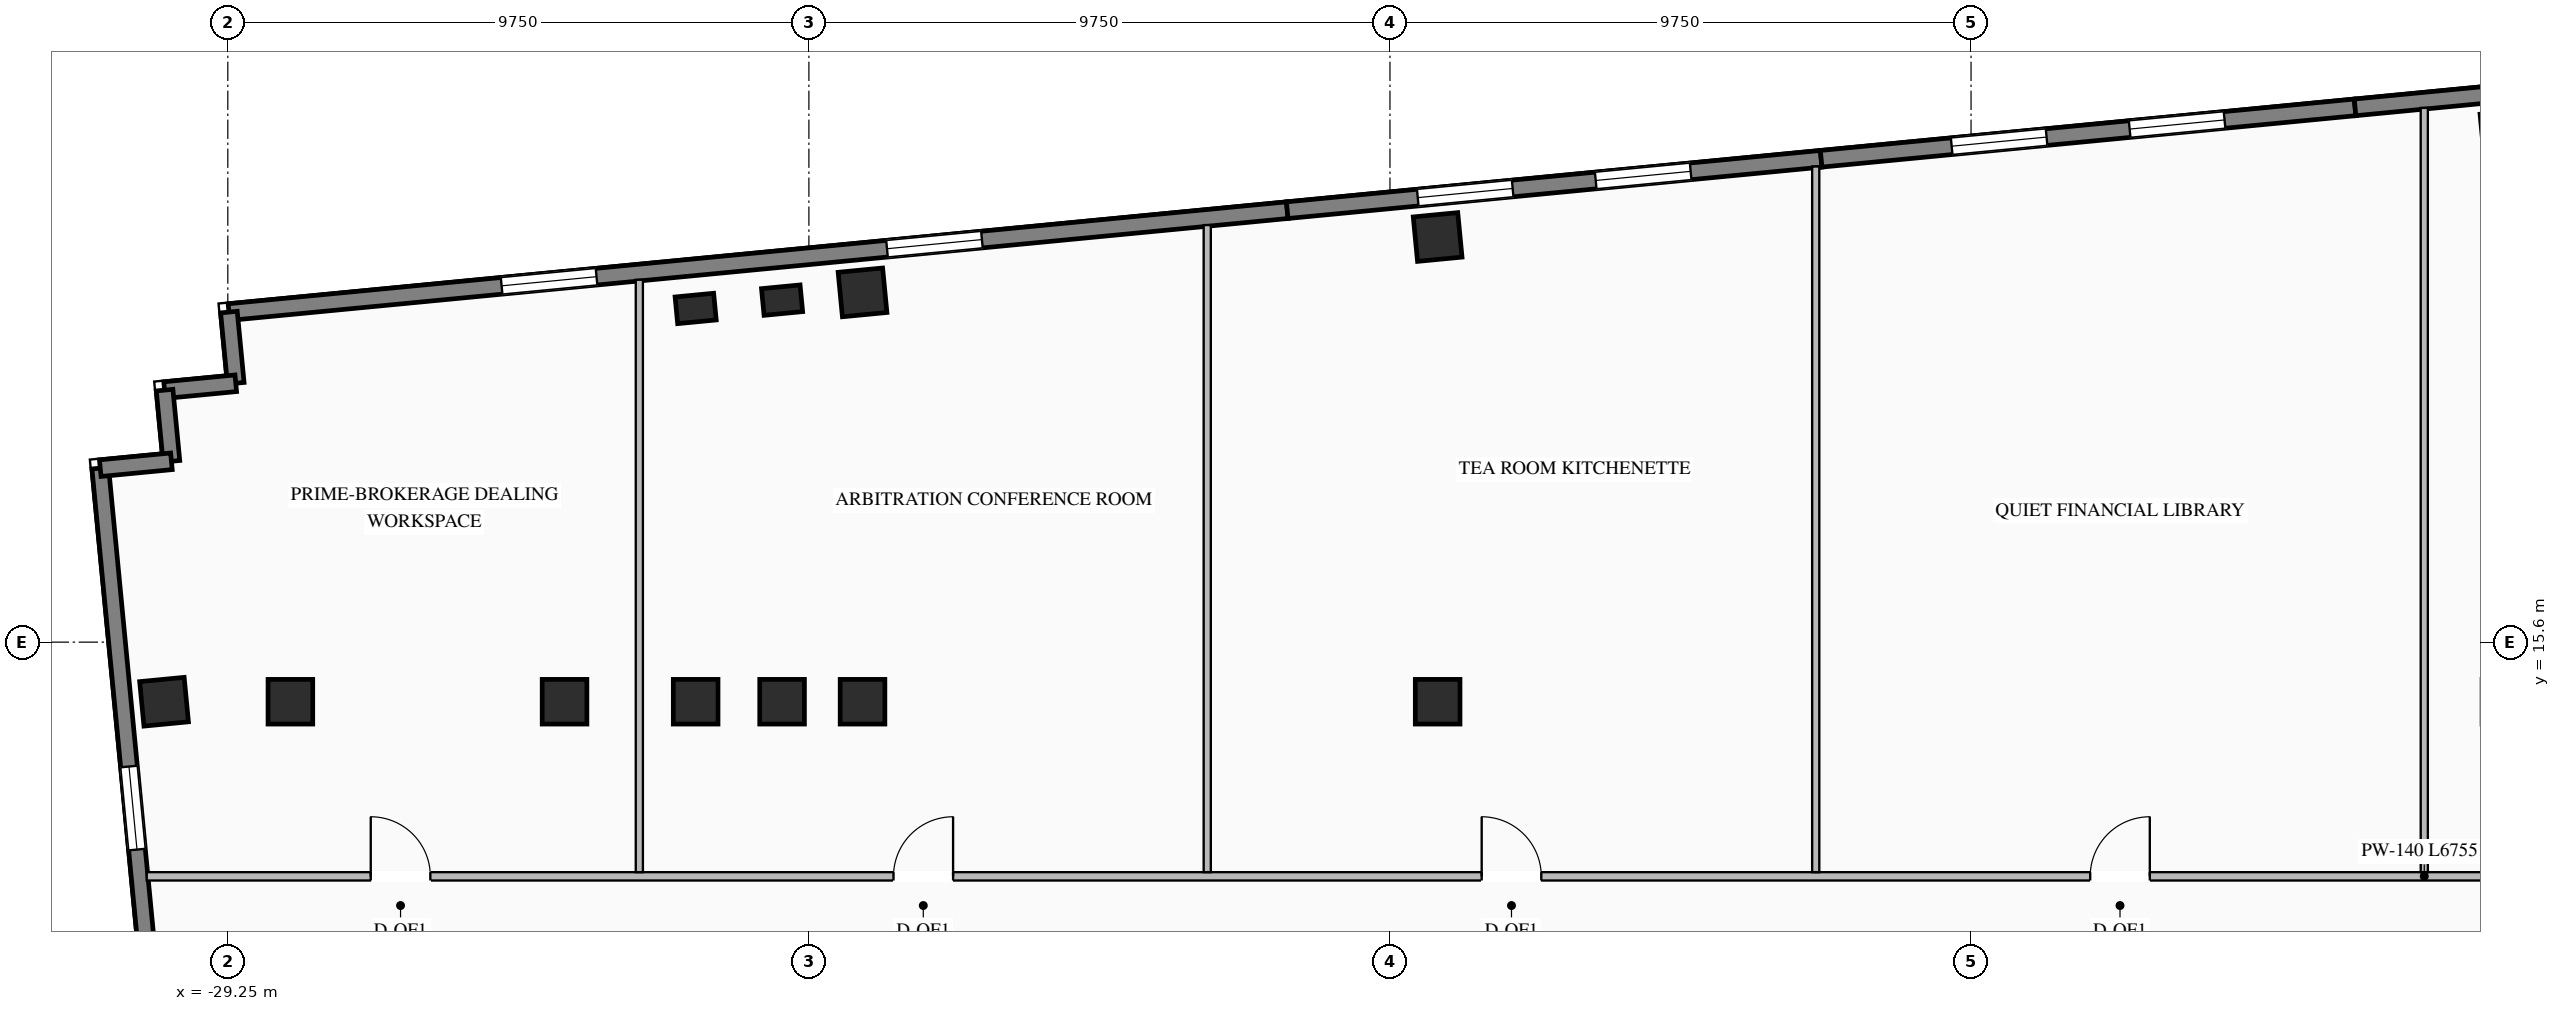
"""IFC4 building model, lengths in metres.
Left out: names, types, materials, properties, quantities, classifications, styles, units other than length and angle.
Written with IfcOpenShell. Run it as: python <this file> out.ifc"""

import sys

from ifc_helpers import new_model, si_unit, direction, frame, frame_2d, origin, origin_2d, place, context, subcontext, project, spatial, rectangle, i_section, extrude, element, fill, save


model = new_model("IFC4")
c1 = context("Model", 3, precision=1e-05, world=origin(), true_north=direction((0.0, 1.0)))
c2 = subcontext(c1, "Body", "Model", "MODEL_VIEW")
j1 = project(units=[si_unit("LENGTHUNIT", "METRE"), si_unit("PLANEANGLEUNIT", "RADIAN")], contexts=[c1])
p1 = place(None, origin())
s1 = spatial("IfcSite", under=j1, at=p1, CompositionType="ELEMENT")
p2 = place(p1, origin())
s2 = spatial("IfcBuilding", under=s1, at=p2, CompositionType="ELEMENT")
p3 = place(p2, frame((0.0, 0.0, 101.8)))
s3 = spatial("IfcBuildingStorey", under=s2, at=p3, CompositionType="ELEMENT", Elevation=101.8)
for number, where, z_axis, x_axis in (
    (1, (-21.4, 14.6, 0.0), (0.0, 0.0, 1.0), (1.0, 0.0, 0.0)),
    (2, (-19.95, 14.6, 0.0), (0.0, 0.0, 1.0), (1.0, 0.0, 0.0)),
    (3, (-18.6, 14.6, 0.0), (0.0, 0.0, 1.0), (1.0, 0.0, 0.0)),
    (4, (-8.95, 14.6, 0.0), (0.0, 0.0, 1.0), (1.0, 0.0, 0.0)),
    (5, (-23.6, 14.6, 0.0), (0.0, 0.0, 1.0), (1.0, 0.0, 0.0)),
    (6, (-28.2, 14.6, 0.0), (0.0, 0.0, 1.0), (1.0, 0.0, 0.0)),
    (7, (-18.6, 21.469, 0.0), (0.0, 0.0, 1.0), (0.995, 0.096, 0.0)),
    (8, (-8.95, 22.398, 0.0), (0.0, 0.0, 1.0), (0.995, 0.096, 0.0)),
    (9, (8.95, 24.122, 0.0), (0.0, 0.0, 1.0), (0.995, 0.096, 0.0)),
    (10, (-30.32, 14.6, 0.0), (0.0, 0.0, 1.0), (0.995, 0.096, 0.0)),
):
    element("IfcColumn", number, at=place(p3, frame(where, z_axis=z_axis, x_axis=x_axis)), inside=s3, PredefinedType="COLUMN", context=c2, shape_type="SweptSolid", body=[
        extrude(i_section(OverallWidth=0.75, OverallDepth=0.75, WebThickness=0.03, FlangeThickness=0.044, at=origin_2d()), origin(), (0.0, 0.0, 1.0), 3.45),
    ])
for number, where, z_axis, x_axis in (
    (11, (-21.4, 21.199, 0.0), (0.0, 0.0, 1.0), (0.995, 0.096, 0.0)),
    (12, (-19.95, 21.339, 0.0), (0.0, 0.0, 1.0), (0.995, 0.096, 0.0)),
):
    element("IfcColumn", number, at=place(p3, frame(where, z_axis=z_axis, x_axis=x_axis)), inside=s3, PredefinedType="PILASTER", context=c2, shape_type="SweptSolid", body=[
        extrude(rectangle(XDim=0.65, YDim=0.45, at=origin_2d()), origin(), (0.0, 0.0, 1.0), 3.45),
    ])
p4 = place(p3, frame((-29.231, 21.138, 0.0), z_axis=(0.0, 0.0, 1.0), x_axis=(0.995395780835, 0.095850088663, 0.0)))
e13 = element("IfcWall", 13, at=p4, inside=s3, PredefinedType="STANDARD", context=c2, shape_type="SweptSolid", body=[
    extrude(rectangle(XDim=17.84, YDim=0.28, at=frame_2d((8.92, 0.0))), origin(), (0.0, 0.0, 1.0), 3.25),
])
p5 = place(p4, frame((4.597, 0.0, 0.76)))
e14 = element("IfcOpeningElement", 14, at=p5, cuts=e13, PredefinedType="OPENING", context=c2, shape_type="SweptSolid", body=[
    extrude(rectangle(XDim=1.6, YDim=1.95, at=frame_2d((0.8, 0.975))), frame((0.0, 0.15, 0.0), z_axis=(0.0, -1.0, 0.0), x_axis=(1.0, 0.0, 0.0)), (0.0, 0.0, 1.0), 0.3),
])
p6 = place(p4, frame((11.093, 0.0, 0.76)))
e15 = element("IfcOpeningElement", 15, at=p6, cuts=e13, PredefinedType="OPENING", context=c2, shape_type="SweptSolid", body=[
    extrude(rectangle(XDim=1.6, YDim=1.95, at=frame_2d((0.8, 0.975))), frame((0.0, 0.15, 0.0), z_axis=(0.0, -1.0, 0.0), x_axis=(1.0, 0.0, 0.0)), (0.0, 0.0, 1.0), 0.3),
])
p7 = place(p3, frame((-11.474, 22.848, 0.0), z_axis=(0.0, 0.0, 1.0), x_axis=(0.995396794462, 0.09583956164, 0.0)))
e16 = element("IfcWall", 16, at=p7, inside=s3, PredefinedType="STANDARD", context=c2, shape_type="SweptSolid", body=[
    extrude(rectangle(XDim=9.0, YDim=0.28, at=frame_2d((4.5, 0.0))), origin(), (0.0, 0.0, 1.0), 3.25),
])
p8 = place(p7, frame((2.2, 0.0, 0.76)))
e17 = element("IfcOpeningElement", 17, at=p8, cuts=e16, PredefinedType="OPENING", context=c2, shape_type="SweptSolid", body=[
    extrude(rectangle(XDim=1.6, YDim=1.95, at=frame_2d((0.8, 0.975))), frame((0.0, 0.15, 0.0), z_axis=(0.0, -1.0, 0.0), x_axis=(1.0, 0.0, 0.0)), (0.0, 0.0, 1.0), 0.3),
])
p9 = place(p7, frame((5.2, 0.0, 0.76)))
e18 = element("IfcOpeningElement", 18, at=p9, cuts=e16, PredefinedType="OPENING", context=c2, shape_type="SweptSolid", body=[
    extrude(rectangle(XDim=1.6, YDim=1.95, at=frame_2d((0.8, 0.975))), frame((0.0, 0.15, 0.0), z_axis=(0.0, -1.0, 0.0), x_axis=(1.0, 0.0, 0.0)), (0.0, 0.0, 1.0), 0.3),
])
p10 = place(p3, frame((-2.515, 23.711, 0.0), z_axis=(0.0, 0.0, 1.0), x_axis=(0.995397043619, 0.095836973841, 0.0)))
e19 = element("IfcWall", 19, at=p10, inside=s3, PredefinedType="STANDARD", context=c2, shape_type="SweptSolid", body=[
    extrude(rectangle(XDim=9.0, YDim=0.28, at=frame_2d((4.5, 0.0))), origin(), (0.0, 0.0, 1.0), 3.25),
])
p11 = place(p10, frame((2.2, 0.0, 0.76)))
e20 = element("IfcOpeningElement", 20, at=p11, cuts=e19, PredefinedType="OPENING", context=c2, shape_type="SweptSolid", body=[
    extrude(rectangle(XDim=1.6, YDim=1.95, at=frame_2d((0.8, 0.975))), frame((0.0, 0.15, 0.0), z_axis=(0.0, -1.0, 0.0), x_axis=(1.0, 0.0, 0.0)), (0.0, 0.0, 1.0), 0.3),
])
p12 = place(p10, frame((5.2, 0.0, 0.76)))
e21 = element("IfcOpeningElement", 21, at=p12, cuts=e19, PredefinedType="OPENING", context=c2, shape_type="SweptSolid", body=[
    extrude(rectangle(XDim=1.6, YDim=1.95, at=frame_2d((0.8, 0.975))), frame((0.0, 0.15, 0.0), z_axis=(0.0, -1.0, 0.0), x_axis=(1.0, 0.0, 0.0)), (0.0, 0.0, 1.0), 0.3),
])
p13 = place(p3, frame((6.444, 24.573, 0.0), z_axis=(0.0, 0.0, 1.0), x_axis=(0.995396794462, 0.09583956164, 0.0)))
e22 = element("IfcWall", 22, at=p13, inside=s3, PredefinedType="STANDARD", context=c2, shape_type="SweptSolid", body=[
    extrude(rectangle(XDim=9.0, YDim=0.28, at=frame_2d((4.5, 0.0))), origin(), (0.0, 0.0, 1.0), 3.25),
])
p14 = place(p13, frame((2.2, 0.0, 0.76)))
e23 = element("IfcOpeningElement", 23, at=p14, cuts=e22, PredefinedType="OPENING", context=c2, shape_type="SweptSolid", body=[
    extrude(rectangle(XDim=1.6, YDim=1.95, at=frame_2d((0.8, 0.975))), frame((0.0, 0.15, 0.0), z_axis=(0.0, -1.0, 0.0), x_axis=(1.0, 0.0, 0.0)), (0.0, 0.0, 1.0), 0.3),
])
p15 = place(p13, frame((5.2, 0.0, 0.76)))
e24 = element("IfcOpeningElement", 24, at=p15, cuts=e22, PredefinedType="OPENING", context=c2, shape_type="SweptSolid", body=[
    extrude(rectangle(XDim=1.6, YDim=1.95, at=frame_2d((0.8, 0.975))), frame((0.0, 0.15, 0.0), z_axis=(0.0, -1.0, 0.0), x_axis=(1.0, 0.0, 0.0)), (0.0, 0.0, 1.0), 0.3),
])
p16 = place(p3, frame((-29.585, -0.234, 0.0), z_axis=(0.0, 0.0, 1.0), x_axis=(-0.095841297881, 0.99539662729, 0.0)))
e25 = element("IfcWall", 25, at=p16, inside=s3, PredefinedType="STANDARD", context=c2, shape_type="SweptSolid", body=[
    extrude(rectangle(XDim=18.84, YDim=0.28, at=frame_2d((9.42, 0.0))), origin(), (0.0, 0.0, 1.0), 3.25),
])
p17 = place(p16, frame((5.58, 0.0, 0.76)))
e26 = element("IfcOpeningElement", 26, at=p17, cuts=e25, PredefinedType="OPENING", context=c2, shape_type="SweptSolid", body=[
    extrude(rectangle(XDim=1.4, YDim=1.95, at=frame_2d((0.7, 0.975))), frame((0.0, 0.15, 0.0), z_axis=(0.0, -1.0, 0.0), x_axis=(1.0, 0.0, 0.0)), (0.0, 0.0, 1.0), 0.3),
])
p18 = place(p16, frame((12.41, 0.0, 0.76)))
e27 = element("IfcOpeningElement", 27, at=p18, cuts=e25, PredefinedType="OPENING", context=c2, shape_type="SweptSolid", body=[
    extrude(rectangle(XDim=1.4, YDim=1.95, at=frame_2d((0.7, 0.975))), frame((0.0, 0.15, 0.0), z_axis=(0.0, -1.0, 0.0), x_axis=(1.0, 0.0, 0.0)), (0.0, 0.0, 1.0), 0.3),
])
for number, where, z_axis, x_axis in (
    (28, (-29.231, 21.138, 0.0), (0.0, 0.0, 1.0), (0.096, -0.995, 0.0)),
    (29, (-29.116, 19.944, 0.0), (0.0, 0.0, 1.0), (-0.995, -0.096, 0.0)),
):
    element("IfcWall", number, at=place(p3, frame(where, z_axis=z_axis, x_axis=x_axis)), inside=s3, PredefinedType="STANDARD", context=c2, shape_type="SweptSolid", body=[
        extrude(rectangle(XDim=1.2, YDim=0.28, at=frame_2d((0.6, 0.0))), origin(), (0.0, 0.0, 1.0), 3.25),
    ])
for number, where, z_axis, x_axis in (
    (30, (-30.311, 19.829, 0.0), (0.0, 0.0, 1.0), (0.096, -0.995, 0.0)),
    (31, (-30.196, 18.635, 0.0), (0.0, 0.0, 1.0), (-0.995, -0.096, 0.0)),
):
    element("IfcWall", number, at=place(p3, frame(where, z_axis=z_axis, x_axis=x_axis)), inside=s3, PredefinedType="STANDARD", context=c2, shape_type="SweptSolid", body=[
        extrude(rectangle(XDim=1.2, YDim=0.28, at=frame_2d((0.6, 0.0))), origin(), (0.0, 0.0, 1.0), 3.25),
    ])
p19 = place(p3, frame((-30.61, 11.67, 0.0), z_axis=(0.0, 0.0, 1.0), x_axis=(1.0, 0.0, 0.0)))
e32 = element("IfcWall", 32, at=p19, inside=s3, PredefinedType="STANDARD", context=c2, shape_type="SweptSolid", body=[
    extrude(rectangle(XDim=67.551, YDim=0.14, at=frame_2d((33.775, 0.0))), origin(), (0.0, 0.0, 1.0), 3.25),
])
p20 = place(p19, frame((3.759, 0.0, 0.0)))
e33 = element("IfcOpeningElement", 33, at=p20, cuts=e32, PredefinedType="OPENING", context=c2, shape_type="SweptSolid", body=[
    extrude(rectangle(XDim=1.0, YDim=2.08, at=frame_2d((0.5, 1.04))), frame((0.0, 0.08, 0.0), z_axis=(0.0, -1.0, 0.0), x_axis=(1.0, 0.0, 0.0)), (0.0, 0.0, 1.0), 0.16),
])
p21 = place(p19, frame((12.53, 0.0, 0.0)))
e34 = element("IfcOpeningElement", 34, at=p21, cuts=e32, PredefinedType="OPENING", context=c2, shape_type="SweptSolid", body=[
    extrude(rectangle(XDim=1.0, YDim=2.08, at=frame_2d((0.5, 1.04))), frame((0.0, 0.08, 0.0), z_axis=(0.0, -1.0, 0.0), x_axis=(1.0, 0.0, 0.0)), (0.0, 0.0, 1.0), 0.16),
])
p22 = place(p19, frame((22.399, 0.0, 0.0)))
e35 = element("IfcOpeningElement", 35, at=p22, cuts=e32, PredefinedType="OPENING", context=c2, shape_type="SweptSolid", body=[
    extrude(rectangle(XDim=1.0, YDim=2.08, at=frame_2d((0.5, 1.04))), frame((0.0, 0.08, 0.0), z_axis=(0.0, -1.0, 0.0), x_axis=(1.0, 0.0, 0.0)), (0.0, 0.0, 1.0), 0.16),
])
p23 = place(p19, frame((32.61, 0.0, 0.0)))
e36 = element("IfcOpeningElement", 36, at=p23, cuts=e32, PredefinedType="OPENING", context=c2, shape_type="SweptSolid", body=[
    extrude(rectangle(XDim=1.0, YDim=2.08, at=frame_2d((0.5, 1.04))), frame((0.0, 0.08, 0.0), z_axis=(0.0, -1.0, 0.0), x_axis=(1.0, 0.0, 0.0)), (0.0, 0.0, 1.0), 0.16),
])
p24 = place(p19, frame((42.82, 0.0, 0.0)))
e37 = element("IfcOpeningElement", 37, at=p24, cuts=e32, PredefinedType="OPENING", context=c2, shape_type="SweptSolid", body=[
    extrude(rectangle(XDim=1.0, YDim=2.08, at=frame_2d((0.5, 1.04))), frame((0.0, 0.08, 0.0), z_axis=(0.0, -1.0, 0.0), x_axis=(1.0, 0.0, 0.0)), (0.0, 0.0, 1.0), 0.16),
])
p25 = place(p19, frame((52.69, 0.0, 0.0)))
e38 = element("IfcOpeningElement", 38, at=p25, cuts=e32, PredefinedType="OPENING", context=c2, shape_type="SweptSolid", body=[
    extrude(rectangle(XDim=1.0, YDim=2.08, at=frame_2d((0.5, 1.04))), frame((0.0, 0.08, 0.0), z_axis=(0.0, -1.0, 0.0), x_axis=(1.0, 0.0, 0.0)), (0.0, 0.0, 1.0), 0.16),
])
p26 = place(p19, frame((62.127, 0.0, 0.0)))
e39 = element("IfcOpeningElement", 39, at=p26, cuts=e32, PredefinedType="OPENING", context=c2, shape_type="SweptSolid", body=[
    extrude(rectangle(XDim=1.0, YDim=2.08, at=frame_2d((0.5, 1.04))), frame((0.0, 0.08, 0.0), z_axis=(0.0, -1.0, 0.0), x_axis=(1.0, 0.0, 0.0)), (0.0, 0.0, 1.0), 0.16),
])
p27 = place(p3, frame((-22.345, 11.74, 0.0), z_axis=(0.0, 0.0, 1.0), x_axis=(0.0, 1.0, 0.0)))
e40 = element("IfcWall", 40, at=p27, inside=s3, PredefinedType="STANDARD", context=c2, shape_type="SweptSolid", body=[
    extrude(rectangle(XDim=9.941, YDim=0.12, at=frame_2d((4.97, 0.0))), origin(), (0.0, 0.0, 1.0), 3.25),
])
p28 = place(p3, frame((-12.816, 11.74, 0.0), z_axis=(0.0, 0.0, 1.0), x_axis=(0.0, 1.0, 0.0)))
e41 = element("IfcWall", 41, at=p28, inside=s3, PredefinedType="STANDARD", context=c2, shape_type="SweptSolid", body=[
    extrude(rectangle(XDim=10.858, YDim=0.12, at=frame_2d((5.429, 0.0))), origin(), (0.0, 0.0, 1.0), 3.25),
])
p29 = place(p3, frame((-2.606, 11.74, 0.0), z_axis=(0.0, 0.0, 1.0), x_axis=(0.0, 1.0, 0.0)))
e42 = element("IfcWall", 42, at=p29, inside=s3, PredefinedType="STANDARD", context=c2, shape_type="SweptSolid", body=[
    extrude(rectangle(XDim=11.842, YDim=0.12, at=frame_2d((5.921, 0.0))), origin(), (0.0, 0.0, 1.0), 3.25),
])
p30 = place(p3, frame((7.605, 11.74, 0.0), z_axis=(0.0, 0.0, 1.0), x_axis=(0.0, 1.0, 0.0)))
e43 = element("IfcWall", 43, at=p30, inside=s3, PredefinedType="STANDARD", context=c2, shape_type="SweptSolid", body=[
    extrude(rectangle(XDim=12.825, YDim=0.12, at=frame_2d((6.412, 0.0))), origin(), (0.0, 0.0, 1.0), 3.25),
])
p31 = place(p5, origin())
e44 = element("IfcWindow", 44, at=p31, inside=s3, PartitioningType="SINGLE_PANEL", PredefinedType="WINDOW", context=c2, shape_type="SweptSolid", body=[
    extrude(rectangle(XDim=1.6, YDim=1.95, at=frame_2d((0.8, 0.975))), frame((0.0, 0.03, 0.0), z_axis=(0.0, -1.0, 0.0), x_axis=(1.0, 0.0, 0.0)), (0.0, 0.0, 1.0), 0.06),
])
fill(e14, e44)
p32 = place(p6, origin())
e45 = element("IfcWindow", 45, at=p32, inside=s3, PartitioningType="SINGLE_PANEL", PredefinedType="WINDOW", context=c2, shape_type="SweptSolid", body=[
    extrude(rectangle(XDim=1.6, YDim=1.95, at=frame_2d((0.8, 0.975))), frame((0.0, 0.03, 0.0), z_axis=(0.0, -1.0, 0.0), x_axis=(1.0, 0.0, 0.0)), (0.0, 0.0, 1.0), 0.06),
])
fill(e15, e45)
p33 = place(p8, origin())
e46 = element("IfcWindow", 46, at=p33, inside=s3, PartitioningType="SINGLE_PANEL", PredefinedType="WINDOW", context=c2, shape_type="SweptSolid", body=[
    extrude(rectangle(XDim=1.6, YDim=1.95, at=frame_2d((0.8, 0.975))), frame((0.0, 0.03, 0.0), z_axis=(0.0, -1.0, 0.0), x_axis=(1.0, 0.0, 0.0)), (0.0, 0.0, 1.0), 0.06),
])
fill(e17, e46)
p34 = place(p9, origin())
e47 = element("IfcWindow", 47, at=p34, inside=s3, PartitioningType="SINGLE_PANEL", PredefinedType="WINDOW", context=c2, shape_type="SweptSolid", body=[
    extrude(rectangle(XDim=1.6, YDim=1.95, at=frame_2d((0.8, 0.975))), frame((0.0, 0.03, 0.0), z_axis=(0.0, -1.0, 0.0), x_axis=(1.0, 0.0, 0.0)), (0.0, 0.0, 1.0), 0.06),
])
fill(e18, e47)
p35 = place(p11, origin())
e48 = element("IfcWindow", 48, at=p35, inside=s3, PartitioningType="SINGLE_PANEL", PredefinedType="WINDOW", context=c2, shape_type="SweptSolid", body=[
    extrude(rectangle(XDim=1.6, YDim=1.95, at=frame_2d((0.8, 0.975))), frame((0.0, 0.03, 0.0), z_axis=(0.0, -1.0, 0.0), x_axis=(1.0, 0.0, 0.0)), (0.0, 0.0, 1.0), 0.06),
])
fill(e20, e48)
p36 = place(p12, origin())
e49 = element("IfcWindow", 49, at=p36, inside=s3, PartitioningType="SINGLE_PANEL", PredefinedType="WINDOW", context=c2, shape_type="SweptSolid", body=[
    extrude(rectangle(XDim=1.6, YDim=1.95, at=frame_2d((0.8, 0.975))), frame((0.0, 0.03, 0.0), z_axis=(0.0, -1.0, 0.0), x_axis=(1.0, 0.0, 0.0)), (0.0, 0.0, 1.0), 0.06),
])
fill(e21, e49)
p37 = place(p18, origin())
e50 = element("IfcWindow", 50, at=p37, inside=s3, PartitioningType="SINGLE_PANEL", PredefinedType="WINDOW", context=c2, shape_type="SweptSolid", body=[
    extrude(rectangle(XDim=1.4, YDim=1.95, at=frame_2d((0.7, 0.975))), frame((0.0, 0.03, 0.0), z_axis=(0.0, -1.0, 0.0), x_axis=(1.0, 0.0, 0.0)), (0.0, 0.0, 1.0), 0.06),
])
fill(e27, e50)
p38 = place(p20, origin())
e51 = element("IfcDoor", 51, at=p38, inside=s3, OperationType="SINGLE_SWING_LEFT", PredefinedType="DOOR", context=c2, shape_type="SweptSolid", body=[
    extrude(rectangle(XDim=1.0, YDim=2.08, at=frame_2d((0.5, 1.04))), frame((0.0, 0.025, 0.0), z_axis=(0.0, -1.0, 0.0), x_axis=(1.0, 0.0, 0.0)), (0.0, 0.0, 1.0), 0.05),
])
fill(e33, e51)
p39 = place(p21, origin())
e52 = element("IfcDoor", 52, at=p39, inside=s3, OperationType="SINGLE_SWING_RIGHT", PredefinedType="DOOR", context=c2, shape_type="SweptSolid", body=[
    extrude(rectangle(XDim=1.0, YDim=2.08, at=frame_2d((0.5, 1.04))), frame((0.0, 0.025, 0.0), z_axis=(0.0, -1.0, 0.0), x_axis=(1.0, 0.0, 0.0)), (0.0, 0.0, 1.0), 0.05),
])
fill(e34, e52)
p40 = place(p22, origin())
e53 = element("IfcDoor", 53, at=p40, inside=s3, OperationType="SINGLE_SWING_LEFT", PredefinedType="DOOR", context=c2, shape_type="SweptSolid", body=[
    extrude(rectangle(XDim=1.0, YDim=2.08, at=frame_2d((0.5, 1.04))), frame((0.0, 0.025, 0.0), z_axis=(0.0, -1.0, 0.0), x_axis=(1.0, 0.0, 0.0)), (0.0, 0.0, 1.0), 0.05),
])
fill(e35, e53)
p41 = place(p23, origin())
e54 = element("IfcDoor", 54, at=p41, inside=s3, OperationType="SINGLE_SWING_RIGHT", PredefinedType="DOOR", context=c2, shape_type="SweptSolid", body=[
    extrude(rectangle(XDim=1.0, YDim=2.08, at=frame_2d((0.5, 1.04))), frame((0.0, 0.025, 0.0), z_axis=(0.0, -1.0, 0.0), x_axis=(1.0, 0.0, 0.0)), (0.0, 0.0, 1.0), 0.05),
])
fill(e36, e54)
save(model, sys.argv[1])
